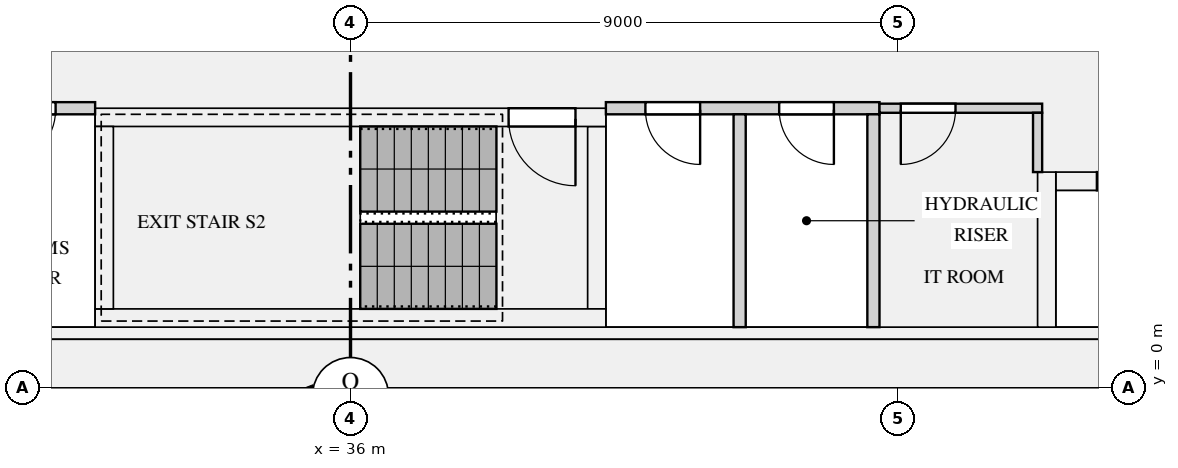
"""IFC4 building model, lengths in metres.
Left out: names, types, materials, properties, quantities, classifications, styles, units other than length and angle.
Written with IfcOpenShell. Run it as: python <this file> out.ifc"""

import sys

from ifc_helpers import new_model, si_unit, direction, frame, frame_2d, origin, place, context, subcontext, project, spatial, rectangle, extrude, element, fill, save


model = new_model("IFC4")
c1 = context("Model", 3, precision=1e-05, world=origin(), true_north=direction((0.0, 1.0)))
c2 = subcontext(c1, "Body", "Model", "MODEL_VIEW")
j1 = project(units=[si_unit("LENGTHUNIT", "METRE"), si_unit("PLANEANGLEUNIT", "RADIAN")], contexts=[c1])
p1 = place(None, origin())
s1 = spatial("IfcSite", under=j1, at=p1, CompositionType="ELEMENT")
p2 = place(p1, origin())
s2 = spatial("IfcBuilding", under=s1, at=p2, CompositionType="ELEMENT")
p3 = place(p2, frame((0.0, 0.0, 127.65)))
s3 = spatial("IfcBuildingStorey", under=s2, at=p3, CompositionType="ELEMENT", Elevation=127.65)
p4 = place(p3, frame((18.8, 0.4, 0.0), z_axis=(0.0, 0.0, 1.0), x_axis=(1.0, 0.0, 0.0)))
e1 = element("IfcWall", 1, at=p4, inside=s3, PredefinedType="SHEAR", context=c2, shape_type="SweptSolid", body=[
    extrude(rectangle(XDim=34.4, YDim=0.8, at=frame_2d((17.2, 0.0))), origin(), (0.0, 0.0, 1.0), 3.15),
])
p5 = place(p3, frame((18.8, 0.9, 0.0), z_axis=(0.0, 0.0, 1.0), x_axis=(1.0, 0.0, 0.0)))
e2 = element("IfcWall", 2, at=p5, inside=s3, PredefinedType="SHEAR", context=c2, shape_type="SweptSolid", body=[
    extrude(rectangle(XDim=34.4, YDim=0.2, at=frame_2d((17.2, 0.0))), origin(), (0.0, 0.0, 1.0), 3.15),
])
p6 = place(p3, frame((47.6, 3.4, 0.0), z_axis=(0.0, 0.0, 1.0), x_axis=(1.0, 0.0, 0.0)))
e3 = element("IfcWall", 3, at=p6, inside=s3, PredefinedType="SHEAR", context=c2, shape_type="SweptSolid", body=[
    extrude(rectangle(XDim=2.55, YDim=0.3, at=frame_2d((1.275, 0.0))), origin(), (0.0, 0.0, 1.0), 3.15),
])
p7 = place(p6, frame((0.675, 0.0, 0.0)))
e4 = element("IfcOpeningElement", 4, at=p7, cuts=e3, PredefinedType="OPENING", context=c2, shape_type="SweptSolid", body=[
    extrude(rectangle(XDim=1.2, YDim=2.1, at=frame_2d((0.6, 1.05))), frame((0.0, 0.16, 0.0), z_axis=(0.0, -1.0, 0.0), x_axis=(1.0, 0.0, 0.0)), (0.0, 0.0, 1.0), 0.32),
])
p8 = place(p3, frame((47.45, 1.0, 0.0), z_axis=(0.0, 0.0, 1.0), x_axis=(0.0, 1.0, 0.0)))
e5 = element("IfcWall", 5, at=p8, inside=s3, PredefinedType="SHEAR", context=c2, shape_type="SweptSolid", body=[
    extrude(rectangle(XDim=2.55, YDim=0.3, at=frame_2d((1.275, 0.0))), origin(), (0.0, 0.0, 1.0), 3.15),
])
p9 = place(p3, frame((31.8, 1.15, 0.0), z_axis=(0.0, 0.0, 1.0), x_axis=(1.0, 0.0, 0.0)))
e6 = element("IfcWall", 6, at=p9, inside=s3, PredefinedType="SHEAR", context=c2, shape_type="SweptSolid", body=[
    extrude(rectangle(XDim=8.4, YDim=0.3, at=frame_2d((4.2, 0.0))), origin(), (0.0, 0.0, 1.0), 3.15),
])
p10 = place(p3, frame((31.8, 4.45, 0.0), z_axis=(0.0, 0.0, 1.0), x_axis=(1.0, 0.0, 0.0)))
e7 = element("IfcWall", 7, at=p10, inside=s3, PredefinedType="SHEAR", context=c2, shape_type="SweptSolid", body=[
    extrude(rectangle(XDim=8.4, YDim=0.3, at=frame_2d((4.2, 0.0))), origin(), (0.0, 0.0, 1.0), 3.15),
])
p11 = place(p10, frame((6.8, 0.0, 0.0)))
e8 = element("IfcOpeningElement", 8, at=p11, cuts=e7, PredefinedType="OPENING", context=c2, shape_type="SweptSolid", body=[
    extrude(rectangle(XDim=1.1, YDim=2.1, at=frame_2d((0.55, 1.05))), frame((0.0, 0.16, 0.0), z_axis=(0.0, -1.0, 0.0), x_axis=(1.0, 0.0, 0.0)), (0.0, 0.0, 1.0), 0.32),
])
for number, where, z_axis, x_axis in (
    (9, (31.95, 1.3, 0.0), (0.0, 0.0, 1.0), (0.0, 1.0, 0.0)),
    (10, (40.05, 1.3, 0.0), (0.0, 0.0, 1.0), (0.0, 1.0, 0.0)),
):
    element("IfcWall", number, at=place(p3, frame(where, z_axis=z_axis, x_axis=x_axis)), inside=s3, PredefinedType="SHEAR", context=c2, shape_type="SweptSolid", body=[
        extrude(rectangle(XDim=3.0, YDim=0.3, at=frame_2d((1.5, 0.0))), origin(), (0.0, 0.0, 1.0), 3.15),
    ])
p12 = place(p3, frame((27.3, 4.6, 0.0), z_axis=(0.0, 0.0, 1.0), x_axis=(1.0, 0.0, 0.0)))
e11 = element("IfcWall", 11, at=p12, inside=s3, PredefinedType="PARTITIONING", context=c2, shape_type="SweptSolid", body=[
    extrude(rectangle(XDim=4.5, YDim=0.2, at=frame_2d((2.25, 0.0))), origin(), (0.0, 0.0, 1.0), 2.65),
])
p13 = place(p12, frame((0.75, 0.0, 0.0)))
e12 = element("IfcOpeningElement", 12, at=p13, cuts=e11, PredefinedType="OPENING", context=c2, shape_type="SweptSolid", body=[
    extrude(rectangle(XDim=0.9, YDim=2.1, at=frame_2d((0.45, 1.05))), frame((0.0, 0.11, 0.0), z_axis=(0.0, -1.0, 0.0), x_axis=(1.0, 0.0, 0.0)), (0.0, 0.0, 1.0), 0.22),
])
p14 = place(p12, frame((2.95, 0.0, 0.0)))
e13 = element("IfcOpeningElement", 13, at=p14, cuts=e11, PredefinedType="OPENING", context=c2, shape_type="SweptSolid", body=[
    extrude(rectangle(XDim=0.9, YDim=2.1, at=frame_2d((0.45, 1.05))), frame((0.0, 0.11, 0.0), z_axis=(0.0, -1.0, 0.0), x_axis=(1.0, 0.0, 0.0)), (0.0, 0.0, 1.0), 0.22),
])
p15 = place(p3, frame((40.2, 4.6, 0.0), z_axis=(0.0, 0.0, 1.0), x_axis=(1.0, 0.0, 0.0)))
e14 = element("IfcWall", 14, at=p15, inside=s3, PredefinedType="PARTITIONING", context=c2, shape_type="SweptSolid", body=[
    extrude(rectangle(XDim=4.5, YDim=0.2, at=frame_2d((2.25, 0.0))), origin(), (0.0, 0.0, 1.0), 2.65),
])
p16 = place(p15, frame((0.65, 0.0, 0.0)))
e15 = element("IfcOpeningElement", 15, at=p16, cuts=e14, PredefinedType="OPENING", context=c2, shape_type="SweptSolid", body=[
    extrude(rectangle(XDim=0.9, YDim=2.1, at=frame_2d((0.45, 1.05))), frame((0.0, 0.11, 0.0), z_axis=(0.0, -1.0, 0.0), x_axis=(1.0, 0.0, 0.0)), (0.0, 0.0, 1.0), 0.22),
])
p17 = place(p15, frame((2.85, 0.0, 0.0)))
e16 = element("IfcOpeningElement", 16, at=p17, cuts=e14, PredefinedType="OPENING", context=c2, shape_type="SweptSolid", body=[
    extrude(rectangle(XDim=0.9, YDim=2.1, at=frame_2d((0.45, 1.05))), frame((0.0, 0.11, 0.0), z_axis=(0.0, -1.0, 0.0), x_axis=(1.0, 0.0, 0.0)), (0.0, 0.0, 1.0), 0.22),
])
p18 = place(p3, frame((44.7, 4.6, 0.0), z_axis=(0.0, 0.0, 1.0), x_axis=(1.0, 0.0, 0.0)))
e17 = element("IfcWall", 17, at=p18, inside=s3, PredefinedType="PARTITIONING", context=c2, shape_type="SweptSolid", body=[
    extrude(rectangle(XDim=2.675, YDim=0.15, at=frame_2d((1.337, 0.0))), origin(), (0.0, 0.0, 1.0), 2.65),
])
p19 = place(p18, frame((0.35, 0.0, 0.0)))
e18 = element("IfcOpeningElement", 18, at=p19, cuts=e17, PredefinedType="OPENING", context=c2, shape_type="SweptSolid", body=[
    extrude(rectangle(XDim=0.9, YDim=2.1, at=frame_2d((0.45, 1.05))), frame((0.0, 0.085, 0.0), z_axis=(0.0, -1.0, 0.0), x_axis=(1.0, 0.0, 0.0)), (0.0, 0.0, 1.0), 0.17),
])
for number, where, z_axis, x_axis in (
    (19, (42.4, 1.0, 0.0), (0.0, 0.0, 1.0), (0.0, 1.0, 0.0)),
    (20, (44.6, 1.0, 0.0), (0.0, 0.0, 1.0), (0.0, 1.0, 0.0)),
):
    element("IfcWall", number, at=place(p3, frame(where, z_axis=z_axis, x_axis=x_axis)), inside=s3, PredefinedType="PARTITIONING", context=c2, shape_type="SweptSolid", body=[
        extrude(rectangle(XDim=3.5, YDim=0.2, at=frame_2d((1.75, 0.0))), origin(), (0.0, 0.0, 1.0), 2.65),
    ])
p20 = place(p3, frame((47.3, 3.55, 0.0), z_axis=(0.0, 0.0, 1.0), x_axis=(0.0, 1.0, 0.0)))
e21 = element("IfcWall", 21, at=p20, inside=s3, PredefinedType="PARTITIONING", context=c2, shape_type="SweptSolid", body=[
    extrude(rectangle(XDim=0.975, YDim=0.15, at=frame_2d((0.487, 0.0))), origin(), (0.0, 0.0, 1.0), 2.65),
])
p21 = place(p7, origin())
e22 = element("IfcDoor", 22, at=p21, inside=s3, OperationType="DOUBLE_DOOR_SLIDING", PredefinedType="DOOR", context=c2, shape_type="SweptSolid", body=[
    extrude(rectangle(XDim=1.2, YDim=2.1, at=frame_2d((0.6, 1.05))), frame((0.0, 0.025, 0.0), z_axis=(0.0, -1.0, 0.0), x_axis=(1.0, 0.0, 0.0)), (0.0, 0.0, 1.0), 0.05),
])
fill(e4, e22)
p22 = place(p11, frame((1.1, 0.0, 0.0), z_axis=(0.0, 0.0, 1.0), x_axis=(-1.0, 0.0, 0.0)))
e23 = element("IfcDoor", 23, at=p22, inside=s3, OperationType="SINGLE_SWING_LEFT", PredefinedType="DOOR", context=c2, shape_type="SweptSolid", body=[
    extrude(rectangle(XDim=1.1, YDim=2.1, at=frame_2d((0.55, 1.05))), frame((0.0, 0.025, 0.0), z_axis=(0.0, -1.0, 0.0), x_axis=(1.0, 0.0, 0.0)), (0.0, 0.0, 1.0), 0.05),
])
fill(e8, e23)
p23 = place(p19, frame((0.9, 0.0, 0.0), z_axis=(0.0, 0.0, 1.0), x_axis=(-1.0, 0.0, 0.0)))
e24 = element("IfcDoor", 24, at=p23, inside=s3, OperationType="SINGLE_SWING_RIGHT", PredefinedType="DOOR", context=c2, shape_type="SweptSolid", body=[
    extrude(rectangle(XDim=0.9, YDim=2.1, at=frame_2d((0.45, 1.05))), frame((0.0, 0.025, 0.0), z_axis=(0.0, -1.0, 0.0), x_axis=(1.0, 0.0, 0.0)), (0.0, 0.0, 1.0), 0.05),
])
fill(e18, e24)
p24 = place(p14, frame((0.9, 0.0, 0.0), z_axis=(0.0, 0.0, 1.0), x_axis=(-1.0, 0.0, 0.0)))
e25 = element("IfcDoor", 25, at=p24, inside=s3, OperationType="SINGLE_SWING_RIGHT", PredefinedType="DOOR", context=c2, shape_type="SweptSolid", body=[
    extrude(rectangle(XDim=0.9, YDim=2.1, at=frame_2d((0.45, 1.05))), frame((0.0, 0.025, 0.0), z_axis=(0.0, -1.0, 0.0), x_axis=(1.0, 0.0, 0.0)), (0.0, 0.0, 1.0), 0.05),
])
fill(e13, e25)
p25 = place(p16, frame((0.9, 0.0, 0.0), z_axis=(0.0, 0.0, 1.0), x_axis=(-1.0, 0.0, 0.0)))
e26 = element("IfcDoor", 26, at=p25, inside=s3, OperationType="SINGLE_SWING_LEFT", PredefinedType="DOOR", context=c2, shape_type="SweptSolid", body=[
    extrude(rectangle(XDim=0.9, YDim=2.1, at=frame_2d((0.45, 1.05))), frame((0.0, 0.025, 0.0), z_axis=(0.0, -1.0, 0.0), x_axis=(1.0, 0.0, 0.0)), (0.0, 0.0, 1.0), 0.05),
])
fill(e15, e26)
p26 = place(p17, frame((0.9, 0.0, 0.0), z_axis=(0.0, 0.0, 1.0), x_axis=(-1.0, 0.0, 0.0)))
e27 = element("IfcDoor", 27, at=p26, inside=s3, OperationType="SINGLE_SWING_LEFT", PredefinedType="DOOR", context=c2, shape_type="SweptSolid", body=[
    extrude(rectangle(XDim=0.9, YDim=2.1, at=frame_2d((0.45, 1.05))), frame((0.0, 0.025, 0.0), z_axis=(0.0, -1.0, 0.0), x_axis=(1.0, 0.0, 0.0)), (0.0, 0.0, 1.0), 0.05),
])
fill(e16, e27)
save(model, sys.argv[1])
